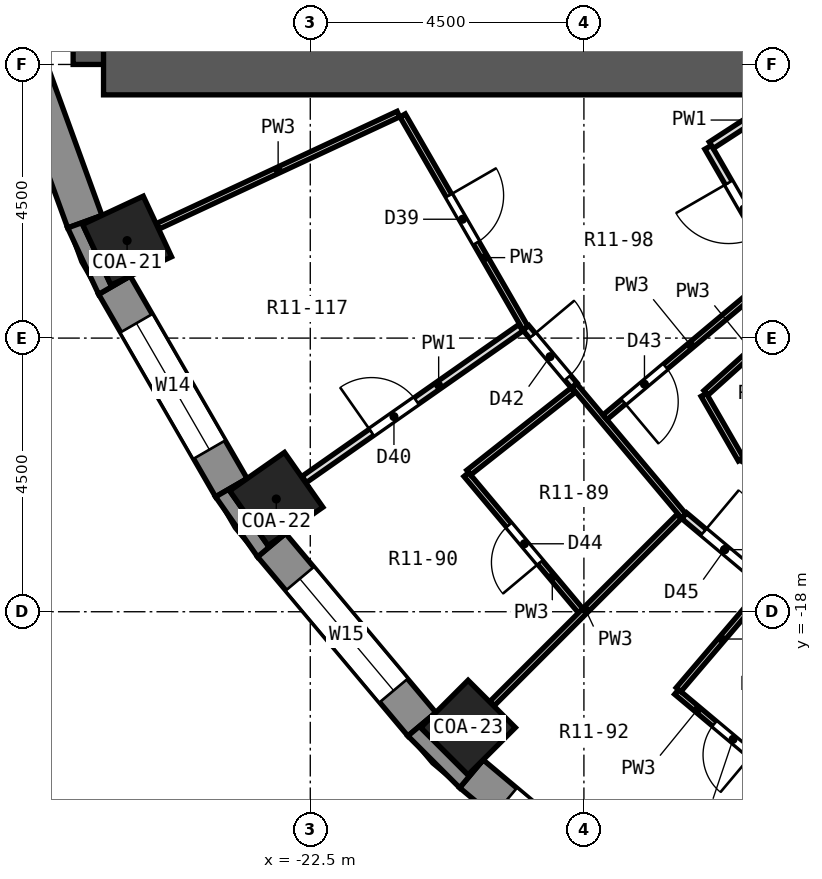
"""IFC4 building model, lengths in metres.
Left out: names, types, materials, properties, quantities, classifications, styles, units other than length and angle.
Written with IfcOpenShell. Run it as: python <this file> out.ifc"""

import sys

from ifc_helpers import new_model, si_unit, direction, frame, frame_2d, origin, origin_2d, place, context, subcontext, project, spatial, polyline, rectangle, outline, extrude, element, fill, save


model = new_model("IFC4")
c1 = context("Model", 3, precision=1e-05, world=origin(), true_north=direction((0.0, 1.0)))
c2 = subcontext(c1, "Body", "Model", "MODEL_VIEW")
j1 = project(units=[si_unit("LENGTHUNIT", "METRE"), si_unit("PLANEANGLEUNIT", "RADIAN")], contexts=[c1])
p1 = place(None, origin())
s1 = spatial("IfcSite", under=j1, at=p1, CompositionType="ELEMENT")
p2 = place(p1, origin())
s2 = spatial("IfcBuilding", under=s1, at=p2, CompositionType="ELEMENT")
p3 = place(p2, frame((0.0, 0.0, 46.1)))
s3 = spatial("IfcBuildingStorey", under=s2, at=p3, CompositionType="ELEMENT", Elevation=46.1)
for number, where, z_axis, x_axis in (
    (1, (-25.512, -11.897, 0.0), (0.0, 0.0, 1.0), (-0.906, -0.423, 0.0)),
    (2, (-23.059, -16.146, 0.0), (0.0, 0.0, 1.0), (-0.819, -0.574, 0.0)),
    (3, (-19.905, -19.905, 0.0), (0.0, 0.0, 1.0), (-0.707, -0.707, 0.0)),
):
    element("IfcColumn", number, at=place(p3, frame(where, z_axis=z_axis, x_axis=x_axis)), inside=s3, PredefinedType="COLUMN", context=c2, shape_type="SweptSolid", body=[
        extrude(rectangle(XDim=1.1, YDim=1.1, at=origin_2d()), origin(), (0.0, 0.0, 1.0), 3.3),
    ])
p4 = place(p3, frame((-25.9, -9.0, 0.0), z_axis=(0.0, 0.0, 1.0), x_axis=(0.0, 1.0, 0.0)))
e4 = element("IfcWall", 4, at=p4, inside=s3, PredefinedType="SHEAR", context=c2, shape_type="SweptSolid", body=[
    extrude(rectangle(XDim=18.0, YDim=1.0, at=frame_2d((9.0, 0.0))), origin(), (0.0, 0.0, 1.0), 3.3),
])
p5 = place(p3, frame((-13.5, -9.0, 0.0), z_axis=(0.0, 0.0, 1.0), x_axis=(-1.0, 0.0, 0.0)))
e5 = element("IfcWall", 5, at=p5, inside=s3, PredefinedType="SHEAR", context=c2, shape_type="SweptSolid", body=[
    extrude(rectangle(XDim=12.4, YDim=1.0, at=frame_2d((6.2, 0.0))), origin(), (0.0, 0.0, 1.0), 3.3),
])
p6 = place(p3, frame((-27.523, -7.971, 0.0), z_axis=(0.0, 0.0, 1.0), x_axis=(0.342028474173, -0.939689588564, 0.0)))
e6 = element("IfcWall", 6, at=p6, inside=s3, PredefinedType="SOLIDWALL", context=c2, shape_type="SweptSolid", body=[
    extrude(rectangle(XDim=3.846, YDim=0.6, at=frame_2d((1.923, 0.0))), origin(), (0.0, 0.0, 1.0), 2.75),
])
p7 = place(p3, frame((-25.721, -12.63, 0.0), z_axis=(0.0, 0.0, 1.0), x_axis=(0.499989888488, -0.86603124159, 0.0)))
e7 = element("IfcWall", 7, at=p7, inside=s3, PredefinedType="SOLIDWALL", context=c2, shape_type="SweptSolid", body=[
    extrude(rectangle(XDim=3.846, YDim=0.6, at=frame_2d((1.923, 0.0))), origin(), (0.0, 0.0, 1.0), 2.75),
])
p8 = place(p7, frame((0.723, 0.0, 0.9)))
e8 = element("IfcOpeningElement", 8, at=p8, cuts=e7, PredefinedType="OPENING", context=c2, shape_type="SweptSolid", body=[
    extrude(rectangle(XDim=2.4, YDim=1.8, at=frame_2d((1.2, 0.9))), frame((0.0, 0.312, 0.0), z_axis=(0.0, -1.0, 0.0), x_axis=(1.0, 0.0, 0.0)), (0.0, 0.0, 1.0), 0.624),
])
p9 = place(p3, frame((-23.137, -16.904, 0.0), z_axis=(0.0, 0.0, 1.0), x_axis=(0.642809392687, -0.766026164483, 0.0)))
e9 = element("IfcWall", 9, at=p9, inside=s3, PredefinedType="SOLIDWALL", context=c2, shape_type="SweptSolid", body=[
    extrude(rectangle(XDim=3.846, YDim=0.6, at=frame_2d((1.923, 0.0))), origin(), (0.0, 0.0, 1.0), 2.75),
])
p10 = place(p9, frame((0.723, 0.0, 0.9)))
e10 = element("IfcOpeningElement", 10, at=p10, cuts=e9, PredefinedType="OPENING", context=c2, shape_type="SweptSolid", body=[
    extrude(rectangle(XDim=2.4, YDim=1.8, at=frame_2d((1.2, 0.9))), frame((0.0, 0.312, 0.0), z_axis=(0.0, -1.0, 0.0), x_axis=(1.0, 0.0, 0.0)), (0.0, 0.0, 1.0), 0.624),
])
p11 = place(p3, frame((-19.85, -20.665, 0.0), z_axis=(0.0, 0.0, 1.0), x_axis=(0.766026164483, -0.642809392687, 0.0)))
e11 = element("IfcWall", 11, at=p11, inside=s3, PredefinedType="SOLIDWALL", context=c2, shape_type="SweptSolid", body=[
    extrude(rectangle(XDim=3.846, YDim=0.6, at=frame_2d((1.923, 0.0))), origin(), (0.0, 0.0, 1.0), 2.75),
])
p12 = place(p11, frame((0.723, 0.0, 0.9)))
e12 = element("IfcOpeningElement", 12, at=p12, cuts=e11, PredefinedType="OPENING", context=c2, shape_type="SweptSolid", body=[
    extrude(rectangle(XDim=2.4, YDim=1.8, at=frame_2d((1.2, 0.9))), frame((0.0, 0.312, 0.0), z_axis=(0.0, -1.0, 0.0), x_axis=(1.0, 0.0, 0.0)), (0.0, 0.0, 1.0), 0.624),
])
p13 = place(p3, origin())
e13 = element("IfcWall", 13, at=p13, inside=s3, PredefinedType="SOLIDWALL", context=c2, shape_type="SweptSolid", body=[
    extrude(outline(polyline([(-25.981, -12.78), (-25.461, -12.479), (-25.779, -12.628), (-26.243, -11.631), (-25.926, -11.483), (-26.49, -11.688), (-25.981, -12.78)])), origin(), (0.0, 0.0, 1.0), 2.75),
])
p14 = place(p3, origin())
e14 = element("IfcWall", 14, at=p14, inside=s3, PredefinedType="SOLIDWALL", context=c2, shape_type="SweptSolid", body=[
    extrude(outline(polyline([(-24.058, -16.11), (-23.367, -17.097), (-22.907, -16.711), (-23.194, -16.912), (-23.825, -16.011), (-23.538, -15.81), (-24.058, -16.11)])), origin(), (0.0, 0.0, 1.0), 2.75),
])
p15 = place(p3, origin())
e15 = element("IfcWall", 15, at=p15, inside=s3, PredefinedType="SOLIDWALL", context=c2, shape_type="SweptSolid", body=[
    extrude(outline(polyline([(-20.043, -20.895), (-19.657, -20.435), (-19.905, -20.683), (-20.683, -19.905), (-20.435, -19.657), (-20.895, -20.043), (-20.043, -20.895)])), origin(), (0.0, 0.0, 1.0), 2.75),
])
p16 = place(p3, frame((-20.981, -9.838, 0.0), z_axis=(0.0, 0.0, 1.0), x_axis=(0.500011837539, -0.86601856927, 0.0)))
e16 = element("IfcWall", 16, at=p16, inside=s3, PredefinedType="PARTITIONING", context=c2, shape_type="SweptSolid", body=[
    extrude(rectangle(XDim=4.041, YDim=0.1, at=frame_2d((2.021, 0.0))), origin(), (0.0, 0.0, 1.0), 2.75),
])
p17 = place(p16, frame((1.521, 0.0, 0.0)))
e17 = element("IfcOpeningElement", 17, at=p17, cuts=e16, PredefinedType="OPENING", context=c2, shape_type="SweptSolid", body=[
    extrude(rectangle(XDim=0.9, YDim=2.1, at=frame_2d((0.45, 1.05))), frame((0.0, 0.062, 0.0), z_axis=(0.0, -1.0, 0.0), x_axis=(1.0, 0.0, 0.0)), (0.0, 0.0, 1.0), 0.124),
])
p18 = place(p3, frame((-16.03, -14.434, 0.0), z_axis=(0.0, 0.0, 1.0), x_axis=(0.499779910804, -0.866152435058, 0.0)))
e18 = element("IfcWall", 18, at=p18, inside=s3, PredefinedType="PARTITIONING", context=c2, shape_type="SweptSolid", body=[
    extrude(rectangle(XDim=1.226, YDim=0.1, at=frame_2d((0.613, 0.0))), origin(), (0.0, 0.0, 1.0), 2.75),
])
p19 = place(p3, frame((-15.957, -10.362, 0.0), z_axis=(0.0, 0.0, 1.0), x_axis=(0.500063859158, -0.865988531543, 0.0)))
e19 = element("IfcWall", 19, at=p19, inside=s3, PredefinedType="PARTITIONING", context=c2, shape_type="SweptSolid", body=[
    extrude(rectangle(XDim=4.168, YDim=0.125, at=frame_2d((2.084, 0.0))), origin(), (0.0, 0.0, 1.0), 2.75),
])
p20 = place(p19, frame((0.674, 0.0, 0.0)))
e20 = element("IfcOpeningElement", 20, at=p20, cuts=e19, PredefinedType="OPENING", context=c2, shape_type="SweptSolid", body=[
    extrude(rectangle(XDim=1.0, YDim=2.1, at=frame_2d((0.5, 1.05))), frame((0.0, 0.074, 0.0), z_axis=(0.0, -1.0, 0.0), x_axis=(1.0, 0.0, 0.0)), (0.0, 0.0, 1.0), 0.149),
])
p21 = place(p3, frame((-19.934, -15.743, 0.0), z_axis=(0.0, 0.0, 1.0), x_axis=(0.642726064959, -0.766096081064, 0.0)))
e21 = element("IfcWall", 21, at=p21, inside=s3, PredefinedType="PARTITIONING", context=c2, shape_type="SweptSolid", body=[
    extrude(rectangle(XDim=2.925, YDim=0.1, at=frame_2d((1.462, 0.0))), origin(), (0.0, 0.0, 1.0), 2.75),
])
p22 = place(p21, frame((1.087, 0.0, 0.0)))
e22 = element("IfcOpeningElement", 22, at=p22, cuts=e21, PredefinedType="OPENING", context=c2, shape_type="SweptSolid", body=[
    extrude(rectangle(XDim=0.8, YDim=2.1, at=frame_2d((0.4, 1.05))), frame((0.0, 0.062, 0.0), z_axis=(0.0, -1.0, 0.0), x_axis=(1.0, 0.0, 0.0)), (0.0, 0.0, 1.0), 0.124),
])
p23 = place(p3, frame((-18.16, -14.279, 0.0), z_axis=(0.0, 0.0, 1.0), x_axis=(0.642859397188, -0.765984200521, 0.0)))
e23 = element("IfcWall", 23, at=p23, inside=s3, PredefinedType="PARTITIONING", context=c2, shape_type="SweptSolid", body=[
    extrude(rectangle(XDim=2.806, YDim=0.1, at=frame_2d((1.403, 0.0))), origin(), (0.0, 0.0, 1.0), 2.75),
])
p24 = place(p3, frame((-18.954, -13.332, 0.0), z_axis=(0.0, 0.0, 1.0), x_axis=(0.642533660644, -0.766257459956, 0.0)))
e24 = element("IfcWall", 24, at=p24, inside=s3, PredefinedType="PARTITIONING", context=c2, shape_type="SweptSolid", body=[
    extrude(rectangle(XDim=1.235, YDim=0.125, at=frame_2d((0.618, 0.0))), origin(), (0.0, 0.0, 1.0), 2.75),
])
p25 = place(p24, frame((0.167, 0.0, 0.0)))
e25 = element("IfcOpeningElement", 25, at=p25, cuts=e24, PredefinedType="OPENING", context=c2, shape_type="SweptSolid", body=[
    extrude(rectangle(XDim=0.9, YDim=2.1, at=frame_2d((0.45, 1.05))), frame((0.0, 0.074, 0.0), z_axis=(0.0, -1.0, 0.0), x_axis=(1.0, 0.0, 0.0)), (0.0, 0.0, 1.0), 0.149),
])
p26 = place(p3, frame((-16.476, -19.319, 0.0), z_axis=(0.0, 0.0, 1.0), x_axis=(0.766109873163, -0.642709625136, 0.0)))
e26 = element("IfcWall", 26, at=p26, inside=s3, PredefinedType="PARTITIONING", context=c2, shape_type="SweptSolid", body=[
    extrude(rectangle(XDim=2.374, YDim=0.1, at=frame_2d((1.187, 0.0))), origin(), (0.0, 0.0, 1.0), 2.75),
])
p27 = place(p26, frame((0.812, 0.0, 0.0)))
e27 = element("IfcOpeningElement", 27, at=p27, cuts=e26, PredefinedType="OPENING", context=c2, shape_type="SweptSolid", body=[
    extrude(rectangle(XDim=0.8, YDim=2.1, at=frame_2d((0.4, 1.05))), frame((0.0, 0.062, 0.0), z_axis=(0.0, -1.0, 0.0), x_axis=(1.0, 0.0, 0.0)), (0.0, 0.0, 1.0), 0.124),
])
p28 = place(p3, frame((-16.351, -16.421, 0.0), z_axis=(0.0, 0.0, 1.0), x_axis=(0.765968068891, -0.642878617967, 0.0)))
e28 = element("IfcWall", 28, at=p28, inside=s3, PredefinedType="PARTITIONING", context=c2, shape_type="SweptSolid", body=[
    extrude(rectangle(XDim=1.736, YDim=0.125, at=frame_2d((0.868, 0.0))), origin(), (0.0, 0.0, 1.0), 2.75),
])
p29 = place(p28, frame((0.418, 0.0, 0.0)))
e29 = element("IfcOpeningElement", 29, at=p29, cuts=e28, PredefinedType="OPENING", context=c2, shape_type="SweptSolid", body=[
    extrude(rectangle(XDim=0.9, YDim=2.1, at=frame_2d((0.45, 1.05))), frame((0.0, 0.074, 0.0), z_axis=(0.0, -1.0, 0.0), x_axis=(1.0, 0.0, 0.0)), (0.0, 0.0, 1.0), 0.149),
])
p30 = place(p3, frame((-15.403, -15.471, 0.0), z_axis=(0.0, 0.0, 1.0), x_axis=(0.866117982198, -0.499839615189, 0.0)))
e30 = element("IfcWall", 30, at=p30, inside=s3, PredefinedType="PARTITIONING", context=c2, shape_type="SweptSolid", body=[
    extrude(rectangle(XDim=1.143, YDim=0.1, at=frame_2d((0.571, 0.0))), origin(), (0.0, 0.0, 1.0), 2.75),
])
p31 = place(p3, frame((-25.005, -11.66, 0.0), z_axis=(0.0, 0.0, 1.0), x_axis=(0.906326060206, 0.422579072591, 0.0)))
e31 = element("IfcWall", 31, at=p31, inside=s3, PredefinedType="PARTITIONING", context=c2, shape_type="SweptSolid", body=[
    extrude(rectangle(XDim=4.363, YDim=0.1, at=frame_2d((2.181, 0.0))), origin(), (0.0, 0.0, 1.0), 2.75),
])
p32 = place(p3, frame((-15.905, -10.328, 0.0), z_axis=(0.0, 0.0, 1.0), x_axis=(0.83882853689, 0.544395706908, 0.0)))
e32 = element("IfcWall", 32, at=p32, inside=s3, PredefinedType="PARTITIONING", context=c2, shape_type="SweptSolid", body=[
    extrude(rectangle(XDim=1.521, YDim=0.125, at=frame_2d((0.76, 0.0))), origin(), (0.0, 0.0, 1.0), 2.75),
])
p33 = place(p3, frame((-22.601, -15.825, 0.0), z_axis=(0.0, 0.0, 1.0), x_axis=(0.819158088694, 0.57356780395, 0.0)))
e33 = element("IfcWall", 33, at=p33, inside=s3, PredefinedType="PARTITIONING", context=c2, shape_type="SweptSolid", body=[
    extrude(rectangle(XDim=4.35, YDim=0.125, at=frame_2d((2.175, 0.0))), origin(), (0.0, 0.0, 1.0), 2.75),
])
p34 = place(p33, frame((1.353, 0.0, 0.0)))
e34 = element("IfcOpeningElement", 34, at=p34, cuts=e33, PredefinedType="OPENING", context=c2, shape_type="SweptSolid", body=[
    extrude(rectangle(XDim=0.9, YDim=2.1, at=frame_2d((0.45, 1.05))), frame((0.0, 0.074, 0.0), z_axis=(0.0, -1.0, 0.0), x_axis=(1.0, 0.0, 0.0)), (0.0, 0.0, 1.0), 0.149),
])
p35 = place(p3, frame((-19.895, -15.712, 0.0), z_axis=(0.0, 0.0, 1.0), x_axis=(0.784868488399, 0.619662372521, 0.0)))
e35 = element("IfcWall", 35, at=p35, inside=s3, PredefinedType="PARTITIONING", context=c2, shape_type="SweptSolid", body=[
    extrude(rectangle(XDim=2.189, YDim=0.1, at=frame_2d((1.094, 0.0))), origin(), (0.0, 0.0, 1.0), 2.75),
])
p36 = place(p3, frame((-17.655, -14.803, 0.0), z_axis=(0.0, 0.0, 1.0), x_axis=(0.766273613589, 0.642514396039, 0.0)))
e36 = element("IfcWall", 36, at=p36, inside=s3, PredefinedType="PARTITIONING", context=c2, shape_type="SweptSolid", body=[
    extrude(rectangle(XDim=3.685, YDim=0.1, at=frame_2d((1.843, 0.0))), origin(), (0.0, 0.0, 1.0), 2.75),
])
p37 = place(p36, frame((0.399, 0.0, 0.0)))
e37 = element("IfcOpeningElement", 37, at=p37, cuts=e36, PredefinedType="OPENING", context=c2, shape_type="SweptSolid", body=[
    extrude(rectangle(XDim=0.9, YDim=2.1, at=frame_2d((0.45, 1.05))), frame((0.0, 0.062, 0.0), z_axis=(0.0, -1.0, 0.0), x_axis=(1.0, 0.0, 0.0)), (0.0, 0.0, 1.0), 0.124),
])
p38 = place(p3, frame((-15.993, -14.401, 0.0), z_axis=(0.0, 0.0, 1.0), x_axis=(0.74316878737, 0.669103993022, 0.0)))
e38 = element("IfcWall", 38, at=p38, inside=s3, PredefinedType="PARTITIONING", context=c2, shape_type="SweptSolid", body=[
    extrude(rectangle(XDim=2.034, YDim=0.1, at=frame_2d((1.017, 0.0))), origin(), (0.0, 0.0, 1.0), 2.75),
])
p39 = place(p3, frame((-19.509, -19.509, 0.0), z_axis=(0.0, 0.0, 1.0), x_axis=(0.707106781187, 0.707106781187, 0.0)))
e39 = element("IfcWall", 39, at=p39, inside=s3, PredefinedType="PARTITIONING", context=c2, shape_type="SweptSolid", body=[
    extrude(rectangle(XDim=4.35, YDim=0.1, at=frame_2d((2.175, 0.0))), origin(), (0.0, 0.0, 1.0), 2.75),
])
p40 = place(p3, frame((-16.444, -19.281, 0.0), z_axis=(0.0, 0.0, 1.0), x_axis=(0.648988401233, 0.760798301171, 0.0)))
e40 = element("IfcWall", 40, at=p40, inside=s3, PredefinedType="PARTITIONING", context=c2, shape_type="SweptSolid", body=[
    extrude(rectangle(XDim=2.188, YDim=0.1, at=frame_2d((1.094, 0.0))), origin(), (0.0, 0.0, 1.0), 2.75),
])
p41 = place(p3, frame((-15.829, -22.597, 0.0), z_axis=(0.0, 0.0, 1.0), x_axis=(0.574588030597, 0.818442786696, 0.0)))
e41 = element("IfcWall", 41, at=p41, inside=s3, PredefinedType="PARTITIONING", context=c2, shape_type="SweptSolid", body=[
    extrude(rectangle(XDim=4.35, YDim=0.1, at=frame_2d((2.175, 0.0))), origin(), (0.0, 0.0, 1.0), 2.75),
])
p42 = place(p8, origin())
e42 = element("IfcWindow", 42, at=p42, inside=s3, PartitioningType="SINGLE_PANEL", PredefinedType="WINDOW", context=c2, shape_type="SweptSolid", body=[
    extrude(rectangle(XDim=2.4, YDim=1.8, at=frame_2d((1.2, 0.9))), frame((0.0, 0.18, 0.0), z_axis=(0.0, -1.0, 0.0), x_axis=(1.0, 0.0, 0.0)), (0.0, 0.0, 1.0), 0.06),
])
fill(e8, e42)
p43 = place(p10, origin())
e43 = element("IfcWindow", 43, at=p43, inside=s3, PartitioningType="SINGLE_PANEL", PredefinedType="WINDOW", context=c2, shape_type="SweptSolid", body=[
    extrude(rectangle(XDim=2.4, YDim=1.8, at=frame_2d((1.2, 0.9))), frame((0.0, 0.18, 0.0), z_axis=(0.0, -1.0, 0.0), x_axis=(1.0, 0.0, 0.0)), (0.0, 0.0, 1.0), 0.06),
])
fill(e10, e43)
p44 = place(p12, origin())
e44 = element("IfcWindow", 44, at=p44, inside=s3, PartitioningType="SINGLE_PANEL", PredefinedType="WINDOW", context=c2, shape_type="SweptSolid", body=[
    extrude(rectangle(XDim=2.4, YDim=1.8, at=frame_2d((1.2, 0.9))), frame((0.0, 0.18, 0.0), z_axis=(0.0, -1.0, 0.0), x_axis=(1.0, 0.0, 0.0)), (0.0, 0.0, 1.0), 0.06),
])
fill(e12, e44)
p45 = place(p17, origin())
e45 = element("IfcDoor", 45, at=p45, inside=s3, OperationType="SINGLE_SWING_LEFT", PredefinedType="DOOR", context=c2, shape_type="SweptSolid", body=[
    extrude(rectangle(XDim=0.9, YDim=2.1, at=frame_2d((0.45, 1.05))), frame((0.0, 0.025, 0.0), z_axis=(0.0, -1.0, 0.0), x_axis=(1.0, 0.0, 0.0)), (0.0, 0.0, 1.0), 0.05),
])
fill(e17, e45)
p46 = place(p34, origin())
e46 = element("IfcDoor", 46, at=p46, inside=s3, OperationType="SINGLE_SWING_LEFT", PredefinedType="DOOR", context=c2, shape_type="SweptSolid", body=[
    extrude(rectangle(XDim=0.9, YDim=2.1, at=frame_2d((0.45, 1.05))), frame((0.0, 0.025, 0.0), z_axis=(0.0, -1.0, 0.0), x_axis=(1.0, 0.0, 0.0)), (0.0, 0.0, 1.0), 0.05),
])
fill(e34, e46)
p47 = place(p20, frame((1.0, 0.0, 0.0), z_axis=(0.0, 0.0, 1.0), x_axis=(-1.0, 0.0, 0.0)))
e47 = element("IfcDoor", 47, at=p47, inside=s3, OperationType="SINGLE_SWING_RIGHT", PredefinedType="DOOR", context=c2, shape_type="SweptSolid", body=[
    extrude(rectangle(XDim=1.0, YDim=2.1, at=frame_2d((0.5, 1.05))), frame((0.0, 0.025, 0.0), z_axis=(0.0, -1.0, 0.0), x_axis=(1.0, 0.0, 0.0)), (0.0, 0.0, 1.0), 0.05),
])
fill(e20, e47)
p48 = place(p25, origin())
e48 = element("IfcDoor", 48, at=p48, inside=s3, OperationType="SINGLE_SWING_LEFT", PredefinedType="DOOR", context=c2, shape_type="SweptSolid", body=[
    extrude(rectangle(XDim=0.9, YDim=2.1, at=frame_2d((0.45, 1.05))), frame((0.0, 0.025, 0.0), z_axis=(0.0, -1.0, 0.0), x_axis=(1.0, 0.0, 0.0)), (0.0, 0.0, 1.0), 0.05),
])
fill(e25, e48)
p49 = place(p37, frame((0.9, 0.0, 0.0), z_axis=(0.0, 0.0, 1.0), x_axis=(-1.0, 0.0, 0.0)))
e49 = element("IfcDoor", 49, at=p49, inside=s3, OperationType="SINGLE_SWING_RIGHT", PredefinedType="DOOR", context=c2, shape_type="SweptSolid", body=[
    extrude(rectangle(XDim=0.9, YDim=2.1, at=frame_2d((0.45, 1.05))), frame((0.0, 0.025, 0.0), z_axis=(0.0, -1.0, 0.0), x_axis=(1.0, 0.0, 0.0)), (0.0, 0.0, 1.0), 0.05),
])
fill(e37, e49)
p50 = place(p22, frame((0.8, 0.0, 0.0), z_axis=(0.0, 0.0, 1.0), x_axis=(-1.0, 0.0, 0.0)))
e50 = element("IfcDoor", 50, at=p50, inside=s3, OperationType="SINGLE_SWING_LEFT", PredefinedType="DOOR", context=c2, shape_type="SweptSolid", body=[
    extrude(rectangle(XDim=0.8, YDim=2.1, at=frame_2d((0.4, 1.05))), frame((0.0, 0.025, 0.0), z_axis=(0.0, -1.0, 0.0), x_axis=(1.0, 0.0, 0.0)), (0.0, 0.0, 1.0), 0.05),
])
fill(e22, e50)
p51 = place(p29, origin())
e51 = element("IfcDoor", 51, at=p51, inside=s3, OperationType="SINGLE_SWING_LEFT", PredefinedType="DOOR", context=c2, shape_type="SweptSolid", body=[
    extrude(rectangle(XDim=0.9, YDim=2.1, at=frame_2d((0.45, 1.05))), frame((0.0, 0.025, 0.0), z_axis=(0.0, -1.0, 0.0), x_axis=(1.0, 0.0, 0.0)), (0.0, 0.0, 1.0), 0.05),
])
fill(e29, e51)
p52 = place(p27, frame((0.8, 0.0, 0.0), z_axis=(0.0, 0.0, 1.0), x_axis=(-1.0, 0.0, 0.0)))
e52 = element("IfcDoor", 52, at=p52, inside=s3, OperationType="SINGLE_SWING_LEFT", PredefinedType="DOOR", context=c2, shape_type="SweptSolid", body=[
    extrude(rectangle(XDim=0.8, YDim=2.1, at=frame_2d((0.4, 1.05))), frame((0.0, 0.025, 0.0), z_axis=(0.0, -1.0, 0.0), x_axis=(1.0, 0.0, 0.0)), (0.0, 0.0, 1.0), 0.05),
])
fill(e27, e52)
save(model, sys.argv[1])
